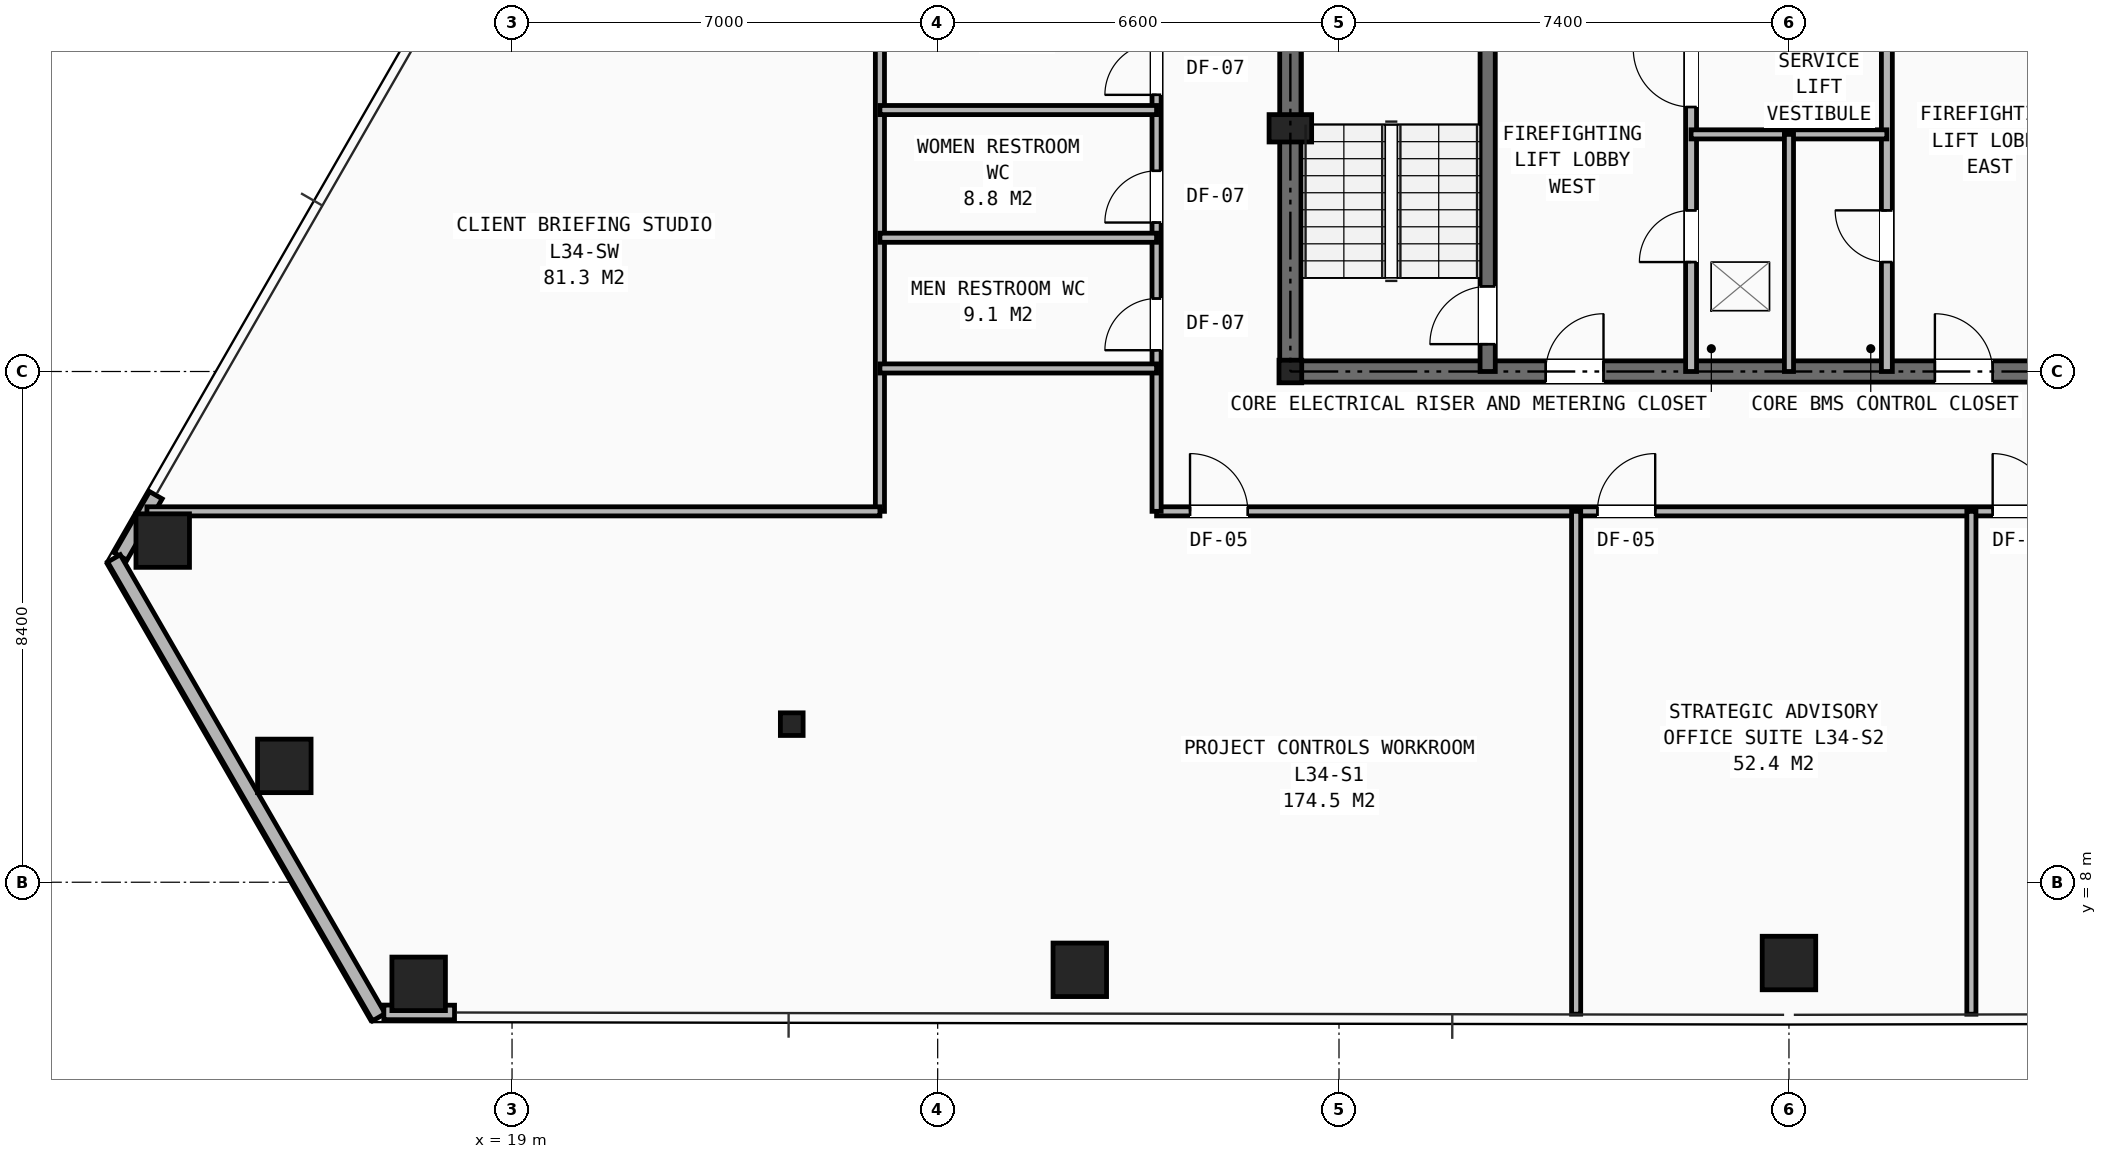
"""IFC4 building model, lengths in metres.
Left out: names, types, materials, properties, quantities, classifications, styles, units other than length and angle.
Written with IfcOpenShell. Run it as: python <this file> out.ifc"""

import sys

from ifc_helpers import new_model, si_unit, direction, frame, frame_2d, origin, origin_2d, place, context, subcontext, project, spatial, rectangle, hollow_rectangle, i_section, extrude, element, fill, save


model = new_model("IFC4")
c1 = context("Model", 3, precision=1e-05, world=origin(), true_north=direction((0.0, 1.0)))
c2 = subcontext(c1, "Body", "Model", "MODEL_VIEW")
j1 = project(units=[si_unit("LENGTHUNIT", "METRE"), si_unit("PLANEANGLEUNIT", "RADIAN")], contexts=[c1])
p1 = place(None, origin())
s1 = spatial("IfcSite", under=j1, at=p1, CompositionType="ELEMENT")
p2 = place(p1, origin())
s2 = spatial("IfcBuilding", under=s1, at=p2, CompositionType="ELEMENT")
p3 = place(p2, frame((0.0, 0.0, 119.45)))
s3 = spatial("IfcBuildingStorey", under=s2, at=p3, CompositionType="ELEMENT", Elevation=119.45)
for number, where, z_axis, x_axis in (
    (1, (31.8, 16.4, 0.0), (0.0, 0.0, 1.0), (1.0, 0.0, 0.0)),
    (2, (23.6, 10.6, 0.0), (0.0, 0.0, 1.0), (1.0, 0.0, 0.0)),
):
    element("IfcColumn", number, at=place(p3, frame(where, z_axis=z_axis, x_axis=x_axis)), inside=s3, PredefinedType="COLUMN", context=c2, shape_type="SweptSolid", body=[
        extrude(i_section(OverallWidth=0.374, OverallDepth=0.372, WebThickness=0.016, FlangeThickness=0.026, at=origin_2d()), origin(), (0.0, 0.0, 1.0), 3.45),
    ])
p4 = place(p3, frame((31.8, 20.4, 0.0), z_axis=(0.0, 0.0, 1.0), x_axis=(1.0, 0.0, 0.0)))
e3 = element("IfcColumn", 3, at=p4, inside=s3, PredefinedType="PILASTER", context=c2, shape_type="SweptSolid", body=[
    extrude(rectangle(XDim=0.7, YDim=0.45, at=origin_2d()), origin(), (0.0, 0.0, 1.0), 3.45),
])
for number, where, z_axis, x_axis in (
    (4, (13.255, 13.619, 0.0), (0.0, 0.0, 1.0), (1.0, 0.0, 0.0)),
    (5, (15.255, 9.913, 0.0), (0.0, 0.0, 1.0), (1.0, 0.0, 0.0)),
    (6, (17.464, 6.329, 0.0), (0.0, 0.0, 1.0), (1.0, 0.0, 0.0)),
    (7, (28.337, 6.56, 0.0), (0.0, 0.0, 1.0), (1.0, 0.0, 0.0)),
    (8, (40.0, 6.671, 0.0), (0.0, 0.0, 1.0), (1.0, 0.0, 0.0)),
):
    element("IfcColumn", number, at=place(p3, frame(where, z_axis=z_axis, x_axis=x_axis)), inside=s3, PredefinedType="COLUMN", context=c2, shape_type="SweptSolid", body=[
        extrude(hollow_rectangle(XDim=0.88, YDim=0.88, WallThickness=0.06, at=origin_2d()), origin(), (0.0, 0.0, 1.0), 3.45),
    ])
p5 = place(p3, frame((13.142, 14.365, 0.0), z_axis=(0.0, 0.0, 1.0), x_axis=(-0.498625017703, -0.866817796149, 0.0)))
e9 = element("IfcWall", 9, at=p5, inside=s3, PredefinedType="SHEAR", context=c2, shape_type="SweptSolid", body=[
    extrude(rectangle(XDim=1.162, YDim=0.24, at=frame_2d((0.581, 0.0))), origin(), (0.0, 0.0, 1.0), 2.583),
])
p6 = place(p3, frame((16.81, 5.78, 0.0), z_axis=(0.0, 0.0, 1.0), x_axis=(-0.499998917442, 0.866026028799, 0.0)))
e10 = element("IfcWall", 10, at=p6, inside=s3, PredefinedType="SHEAR", context=c2, shape_type="SweptSolid", body=[
    extrude(rectangle(XDim=8.714, YDim=0.24, at=frame_2d((4.357, 0.0))), origin(), (0.0, 0.0, 1.0), 2.583),
])
p7 = place(p3, frame((16.892, 5.86, 0.0), z_axis=(0.0, 0.0, 1.0), x_axis=(0.999998588859, -0.00167996403, 0.0)))
e11 = element("IfcWall", 11, at=p7, inside=s3, PredefinedType="SHEAR", context=c2, shape_type="SweptSolid", body=[
    extrude(rectangle(XDim=1.163, YDim=0.24, at=frame_2d((0.581, 0.0))), origin(), (0.0, 0.0, 1.0), 2.583),
])
p8 = place(p3, frame((31.8, 16.4, 0.0), z_axis=(0.0, 0.0, 1.0), x_axis=(1.0, 0.0, 0.0)))
e12 = element("IfcWall", 12, at=p8, inside=s3, PredefinedType="SHEAR", context=c2, shape_type="SweptSolid", body=[
    extrude(rectangle(XDim=16.4, YDim=0.35, at=frame_2d((8.2, 0.0))), origin(), (0.0, 0.0, 1.0), 3.21),
])
p9 = place(p8, frame((4.2, 0.0, 0.0)))
e13 = element("IfcOpeningElement", 13, at=p9, cuts=e12, PredefinedType="OPENING", context=c2, shape_type="SweptSolid", body=[
    extrude(rectangle(XDim=0.95, YDim=2.1, at=frame_2d((0.475, 1.05))), frame((0.0, 0.185, 0.0), z_axis=(0.0, -1.0, 0.0), x_axis=(1.0, 0.0, 0.0)), (0.0, 0.0, 1.0), 0.37),
])
p10 = place(p8, frame((10.6, 0.0, 0.0)))
e14 = element("IfcOpeningElement", 14, at=p10, cuts=e12, PredefinedType="OPENING", context=c2, shape_type="SweptSolid", body=[
    extrude(rectangle(XDim=0.95, YDim=2.1, at=frame_2d((0.475, 1.05))), frame((0.0, 0.185, 0.0), z_axis=(0.0, -1.0, 0.0), x_axis=(1.0, 0.0, 0.0)), (0.0, 0.0, 1.0), 0.37),
])
p11 = place(p3, frame((31.8, 16.4, 0.0), z_axis=(0.0, 0.0, 1.0), x_axis=(0.0, 1.0, 0.0)))
e15 = element("IfcWall", 15, at=p11, inside=s3, PredefinedType="SHEAR", context=c2, shape_type="SweptSolid", body=[
    extrude(rectangle(XDim=14.8, YDim=0.35, at=frame_2d((7.4, 0.0))), origin(), (0.0, 0.0, 1.0), 3.21),
])
p12 = place(p11, frame((11.0, 0.0, 0.0)))
e16 = element("IfcOpeningElement", 16, at=p12, cuts=e15, PredefinedType="OPENING", context=c2, shape_type="SweptSolid", body=[
    extrude(rectangle(XDim=1.1, YDim=2.15, at=frame_2d((0.55, 1.075))), frame((0.0, 0.185, 0.0), z_axis=(0.0, -1.0, 0.0), x_axis=(1.0, 0.0, 0.0)), (0.0, 0.0, 1.0), 0.37),
])
p13 = place(p3, frame((35.045, 16.4, 0.0), z_axis=(0.0, 0.0, 1.0), x_axis=(0.0, 1.0, 0.0)))
e17 = element("IfcWall", 17, at=p13, inside=s3, PredefinedType="SHEAR", context=c2, shape_type="SweptSolid", body=[
    extrude(rectangle(XDim=8.4, YDim=0.25, at=frame_2d((4.2, 0.0))), origin(), (0.0, 0.0, 1.0), 3.21),
])
p14 = place(p13, frame((0.45, 0.0, 0.0)))
e18 = element("IfcOpeningElement", 18, at=p14, cuts=e17, PredefinedType="OPENING", context=c2, shape_type="SweptSolid", body=[
    extrude(rectangle(XDim=0.95, YDim=2.1, at=frame_2d((0.475, 1.05))), frame((0.0, 0.135, 0.0), z_axis=(0.0, -1.0, 0.0), x_axis=(1.0, 0.0, 0.0)), (0.0, 0.0, 1.0), 0.27),
])
p15 = place(p3, frame((38.39, 16.4, 0.0), z_axis=(0.0, 0.0, 1.0), x_axis=(0.0, 1.0, 0.0)))
e19 = element("IfcWall", 19, at=p15, inside=s3, PredefinedType="PARTITIONING", context=c2, shape_type="SweptSolid", body=[
    extrude(rectangle(XDim=8.4, YDim=0.18, at=frame_2d((4.2, 0.0))), origin(), (0.0, 0.0, 1.0), 2.661),
])
p16 = place(p15, frame((1.8, 0.0, 0.0)))
e20 = element("IfcOpeningElement", 20, at=p16, cuts=e19, PredefinedType="OPENING", context=c2, shape_type="SweptSolid", body=[
    extrude(rectangle(XDim=0.85, YDim=2.05, at=frame_2d((0.425, 1.025))), frame((0.0, 0.1, 0.0), z_axis=(0.0, -1.0, 0.0), x_axis=(1.0, 0.0, 0.0)), (0.0, 0.0, 1.0), 0.2),
])
p17 = place(p15, frame((4.35, 0.0, 0.0)))
e21 = element("IfcOpeningElement", 21, at=p17, cuts=e19, PredefinedType="OPENING", context=c2, shape_type="SweptSolid", body=[
    extrude(rectangle(XDim=0.95, YDim=2.1, at=frame_2d((0.475, 1.05))), frame((0.0, 0.1, 0.0), z_axis=(0.0, -1.0, 0.0), x_axis=(1.0, 0.0, 0.0)), (0.0, 0.0, 1.0), 0.2),
])
p18 = place(p3, frame((41.61, 16.4, 0.0), z_axis=(0.0, 0.0, 1.0), x_axis=(0.0, 1.0, 0.0)))
e22 = element("IfcWall", 22, at=p18, inside=s3, PredefinedType="PARTITIONING", context=c2, shape_type="SweptSolid", body=[
    extrude(rectangle(XDim=8.4, YDim=0.18, at=frame_2d((4.2, 0.0))), origin(), (0.0, 0.0, 1.0), 2.661),
])
p19 = place(p18, frame((1.8, 0.0, 0.0)))
e23 = element("IfcOpeningElement", 23, at=p19, cuts=e22, PredefinedType="OPENING", context=c2, shape_type="SweptSolid", body=[
    extrude(rectangle(XDim=0.85, YDim=2.05, at=frame_2d((0.425, 1.025))), frame((0.0, 0.1, 0.0), z_axis=(0.0, -1.0, 0.0), x_axis=(1.0, 0.0, 0.0)), (0.0, 0.0, 1.0), 0.2),
])
p20 = place(p3, frame((38.39, 20.3, 0.0), z_axis=(0.0, 0.0, 1.0), x_axis=(1.0, 0.0, 0.0)))
e24 = element("IfcWall", 24, at=p20, inside=s3, PredefinedType="PARTITIONING", context=c2, shape_type="SweptSolid", body=[
    extrude(rectangle(XDim=3.22, YDim=0.15, at=frame_2d((1.61, 0.0))), origin(), (0.0, 0.0, 1.0), 3.21),
])
p21 = place(p3, frame((40.0, 16.4, 0.0), z_axis=(0.0, 0.0, 1.0), x_axis=(0.0, 1.0, 0.0)))
e25 = element("IfcWall", 25, at=p21, inside=s3, PredefinedType="PARTITIONING", context=c2, shape_type="SweptSolid", body=[
    extrude(rectangle(XDim=3.9, YDim=0.15, at=frame_2d((1.95, 0.0))), origin(), (0.0, 0.0, 1.0), 2.661),
])
p22 = place(p3, frame((29.6, 14.1, 0.0), z_axis=(0.0, 0.0, 1.0), x_axis=(1.0, 0.0, 0.0)))
e26 = element("IfcWall", 26, at=p22, inside=s3, PredefinedType="PARTITIONING", context=c2, shape_type="SweptSolid", body=[
    extrude(rectangle(XDim=18.6, YDim=0.15, at=frame_2d((9.3, 0.0))), origin(), (0.0, 0.0, 1.0), 2.252),
])
p23 = place(p22, frame((0.55, 0.0, 0.0)))
e27 = element("IfcOpeningElement", 27, at=p23, cuts=e26, PredefinedType="OPENING", context=c2, shape_type="SweptSolid", body=[
    extrude(rectangle(XDim=0.95, YDim=2.1, at=frame_2d((0.475, 1.05))), frame((0.0, 0.085, 0.0), z_axis=(0.0, -1.0, 0.0), x_axis=(1.0, 0.0, 0.0)), (0.0, 0.0, 1.0), 0.17),
])
p24 = place(p22, frame((7.25, 0.0, 0.0)))
e28 = element("IfcOpeningElement", 28, at=p24, cuts=e26, PredefinedType="OPENING", context=c2, shape_type="SweptSolid", body=[
    extrude(rectangle(XDim=0.95, YDim=2.1, at=frame_2d((0.475, 1.05))), frame((0.0, 0.085, 0.0), z_axis=(0.0, -1.0, 0.0), x_axis=(1.0, 0.0, 0.0)), (0.0, 0.0, 1.0), 0.17),
])
p25 = place(p22, frame((13.75, 0.0, 0.0)))
e29 = element("IfcOpeningElement", 29, at=p25, cuts=e26, PredefinedType="OPENING", context=c2, shape_type="SweptSolid", body=[
    extrude(rectangle(XDim=0.95, YDim=2.1, at=frame_2d((0.475, 1.05))), frame((0.0, 0.085, 0.0), z_axis=(0.0, -1.0, 0.0), x_axis=(1.0, 0.0, 0.0)), (0.0, 0.0, 1.0), 0.17),
])
p26 = place(p3, frame((29.6, 14.1, 0.0), z_axis=(0.0, 0.0, 1.0), x_axis=(0.0, 1.0, 0.0)))
e30 = element("IfcWall", 30, at=p26, inside=s3, PredefinedType="PARTITIONING", context=c2, shape_type="SweptSolid", body=[
    extrude(rectangle(XDim=8.7, YDim=0.15, at=frame_2d((4.35, 0.0))), origin(), (0.0, 0.0, 1.0), 3.21),
])
p27 = place(p26, frame((2.65, 0.0, 0.0)))
e31 = element("IfcOpeningElement", 31, at=p27, cuts=e30, PredefinedType="OPENING", context=c2, shape_type="SweptSolid", body=[
    extrude(rectangle(XDim=0.85, YDim=2.05, at=frame_2d((0.425, 1.025))), frame((0.0, 0.085, 0.0), z_axis=(0.0, -1.0, 0.0), x_axis=(1.0, 0.0, 0.0)), (0.0, 0.0, 1.0), 0.17),
])
p28 = place(p26, frame((4.75, 0.0, 0.0)))
e32 = element("IfcOpeningElement", 32, at=p28, cuts=e30, PredefinedType="OPENING", context=c2, shape_type="SweptSolid", body=[
    extrude(rectangle(XDim=0.85, YDim=2.05, at=frame_2d((0.425, 1.025))), frame((0.0, 0.085, 0.0), z_axis=(0.0, -1.0, 0.0), x_axis=(1.0, 0.0, 0.0)), (0.0, 0.0, 1.0), 0.17),
])
p29 = place(p26, frame((6.85, 0.0, 0.0)))
e33 = element("IfcOpeningElement", 33, at=p29, cuts=e30, PredefinedType="OPENING", context=c2, shape_type="SweptSolid", body=[
    extrude(rectangle(XDim=0.85, YDim=2.05, at=frame_2d((0.425, 1.025))), frame((0.0, 0.085, 0.0), z_axis=(0.0, -1.0, 0.0), x_axis=(1.0, 0.0, 0.0)), (0.0, 0.0, 1.0), 0.17),
])
p30 = place(p3, frame((25.05, 14.1, 0.0), z_axis=(0.0, 0.0, 1.0), x_axis=(0.0, 1.0, 0.0)))
e34 = element("IfcWall", 34, at=p30, inside=s3, PredefinedType="PARTITIONING", context=c2, shape_type="SweptSolid", body=[
    extrude(rectangle(XDim=8.7, YDim=0.15, at=frame_2d((4.35, 0.0))), origin(), (0.0, 0.0, 1.0), 3.21),
])
for number, where, z_axis, x_axis in (
    (35, (25.05, 16.45, 0.0), (0.0, 0.0, 1.0), (1.0, 0.0, 0.0)),
    (36, (25.05, 18.6, 0.0), (0.0, 0.0, 1.0), (1.0, 0.0, 0.0)),
    (37, (25.05, 20.7, 0.0), (0.0, 0.0, 1.0), (1.0, 0.0, 0.0)),
):
    element("IfcWall", number, at=place(p3, frame(where, z_axis=z_axis, x_axis=x_axis)), inside=s3, PredefinedType="PARTITIONING", context=c2, shape_type="SweptSolid", body=[
        extrude(rectangle(XDim=4.55, YDim=0.15, at=frame_2d((2.275, 0.0))), origin(), (0.0, 0.0, 1.0), 3.21),
    ])
p31 = place(p3, frame((36.5, 5.83, 0.0), z_axis=(0.0, 0.0, 1.0), x_axis=(0.0, 1.0, 0.0)))
e38 = element("IfcWall", 38, at=p31, inside=s3, PredefinedType="PARTITIONING", context=c2, shape_type="SweptSolid", body=[
    extrude(rectangle(XDim=8.27, YDim=0.15, at=frame_2d((4.135, 0.0))), origin(), (0.0, 0.0, 1.0), 2.252),
])
p32 = place(p3, frame((43.0, 5.83, 0.0), z_axis=(0.0, 0.0, 1.0), x_axis=(0.0, 1.0, 0.0)))
e39 = element("IfcWall", 39, at=p32, inside=s3, PredefinedType="PARTITIONING", context=c2, shape_type="SweptSolid", body=[
    extrude(rectangle(XDim=8.271, YDim=0.15, at=frame_2d((4.135, 0.0))), origin(), (0.0, 0.0, 1.0), 2.589),
])
p33 = place(p3, frame((12.995, 14.1, 0.0), z_axis=(0.0, 0.0, 1.0), x_axis=(1.0, 0.0, 0.0)))
e40 = element("IfcWall", 40, at=p33, inside=s3, PredefinedType="PARTITIONING", context=c2, shape_type="SweptSolid", body=[
    extrude(rectangle(XDim=12.055, YDim=0.15, at=frame_2d((6.027, 0.0))), origin(), (0.0, 0.0, 1.0), 2.589),
])
p34 = place(p16, origin())
e41 = element("IfcDoor", 41, at=p34, inside=s3, OperationType="SINGLE_SWING_LEFT", PredefinedType="DOOR", context=c2, shape_type="SweptSolid", body=[
    extrude(rectangle(XDim=0.85, YDim=2.05, at=frame_2d((0.425, 1.025))), frame((0.0, 0.025, 0.0), z_axis=(0.0, -1.0, 0.0), x_axis=(1.0, 0.0, 0.0)), (0.0, 0.0, 1.0), 0.05),
])
fill(e20, e41)
p35 = place(p19, origin())
e42 = element("IfcDoor", 42, at=p35, inside=s3, OperationType="SINGLE_SWING_RIGHT", PredefinedType="DOOR", context=c2, shape_type="SweptSolid", body=[
    extrude(rectangle(XDim=0.85, YDim=2.05, at=frame_2d((0.425, 1.025))), frame((0.0, 0.025, 0.0), z_axis=(0.0, -1.0, 0.0), x_axis=(1.0, 0.0, 0.0)), (0.0, 0.0, 1.0), 0.05),
])
fill(e23, e42)
p36 = place(p17, origin())
e43 = element("IfcDoor", 43, at=p36, inside=s3, OperationType="SINGLE_SWING_RIGHT", PredefinedType="DOOR", context=c2, shape_type="SweptSolid", body=[
    extrude(rectangle(XDim=0.95, YDim=2.1, at=frame_2d((0.475, 1.05))), frame((0.0, 0.025, 0.0), z_axis=(0.0, -1.0, 0.0), x_axis=(1.0, 0.0, 0.0)), (0.0, 0.0, 1.0), 0.05),
])
fill(e21, e43)
p37 = place(p14, origin())
e44 = element("IfcDoor", 44, at=p37, inside=s3, OperationType="SINGLE_SWING_LEFT", PredefinedType="DOOR", context=c2, shape_type="SweptSolid", body=[
    extrude(rectangle(XDim=0.95, YDim=2.1, at=frame_2d((0.475, 1.05))), frame((0.0, 0.025, 0.0), z_axis=(0.0, -1.0, 0.0), x_axis=(1.0, 0.0, 0.0)), (0.0, 0.0, 1.0), 0.05),
])
fill(e18, e44)
p38 = place(p9, origin())
e45 = element("IfcDoor", 45, at=p38, inside=s3, OperationType="SINGLE_SWING_RIGHT", PredefinedType="DOOR", context=c2, shape_type="SweptSolid", body=[
    extrude(rectangle(XDim=0.95, YDim=2.1, at=frame_2d((0.475, 1.05))), frame((0.0, 0.025, 0.0), z_axis=(0.0, -1.0, 0.0), x_axis=(1.0, 0.0, 0.0)), (0.0, 0.0, 1.0), 0.05),
])
fill(e13, e45)
p39 = place(p10, origin())
e46 = element("IfcDoor", 46, at=p39, inside=s3, OperationType="SINGLE_SWING_LEFT", PredefinedType="DOOR", context=c2, shape_type="SweptSolid", body=[
    extrude(rectangle(XDim=0.95, YDim=2.1, at=frame_2d((0.475, 1.05))), frame((0.0, 0.025, 0.0), z_axis=(0.0, -1.0, 0.0), x_axis=(1.0, 0.0, 0.0)), (0.0, 0.0, 1.0), 0.05),
])
fill(e14, e46)
p40 = place(p27, origin())
e47 = element("IfcDoor", 47, at=p40, inside=s3, OperationType="SINGLE_SWING_LEFT", PredefinedType="DOOR", context=c2, shape_type="SweptSolid", body=[
    extrude(rectangle(XDim=0.85, YDim=2.05, at=frame_2d((0.425, 1.025))), frame((0.0, 0.025, 0.0), z_axis=(0.0, -1.0, 0.0), x_axis=(1.0, 0.0, 0.0)), (0.0, 0.0, 1.0), 0.05),
])
fill(e31, e47)
p41 = place(p28, origin())
e48 = element("IfcDoor", 48, at=p41, inside=s3, OperationType="SINGLE_SWING_LEFT", PredefinedType="DOOR", context=c2, shape_type="SweptSolid", body=[
    extrude(rectangle(XDim=0.85, YDim=2.05, at=frame_2d((0.425, 1.025))), frame((0.0, 0.025, 0.0), z_axis=(0.0, -1.0, 0.0), x_axis=(1.0, 0.0, 0.0)), (0.0, 0.0, 1.0), 0.05),
])
fill(e32, e48)
p42 = place(p29, origin())
e49 = element("IfcDoor", 49, at=p42, inside=s3, OperationType="SINGLE_SWING_LEFT", PredefinedType="DOOR", context=c2, shape_type="SweptSolid", body=[
    extrude(rectangle(XDim=0.85, YDim=2.05, at=frame_2d((0.425, 1.025))), frame((0.0, 0.025, 0.0), z_axis=(0.0, -1.0, 0.0), x_axis=(1.0, 0.0, 0.0)), (0.0, 0.0, 1.0), 0.05),
])
fill(e33, e49)
p43 = place(p23, origin())
e50 = element("IfcDoor", 50, at=p43, inside=s3, OperationType="SINGLE_SWING_LEFT", PredefinedType="DOOR", context=c2, shape_type="SweptSolid", body=[
    extrude(rectangle(XDim=0.95, YDim=2.1, at=frame_2d((0.475, 1.05))), frame((0.0, 0.025, 0.0), z_axis=(0.0, -1.0, 0.0), x_axis=(1.0, 0.0, 0.0)), (0.0, 0.0, 1.0), 0.05),
])
fill(e27, e50)
p44 = place(p24, origin())
e51 = element("IfcDoor", 51, at=p44, inside=s3, OperationType="SINGLE_SWING_RIGHT", PredefinedType="DOOR", context=c2, shape_type="SweptSolid", body=[
    extrude(rectangle(XDim=0.95, YDim=2.1, at=frame_2d((0.475, 1.05))), frame((0.0, 0.025, 0.0), z_axis=(0.0, -1.0, 0.0), x_axis=(1.0, 0.0, 0.0)), (0.0, 0.0, 1.0), 0.05),
])
fill(e28, e51)
p45 = place(p25, origin())
e52 = element("IfcDoor", 52, at=p45, inside=s3, OperationType="SINGLE_SWING_LEFT", PredefinedType="DOOR", context=c2, shape_type="SweptSolid", body=[
    extrude(rectangle(XDim=0.95, YDim=2.1, at=frame_2d((0.475, 1.05))), frame((0.0, 0.025, 0.0), z_axis=(0.0, -1.0, 0.0), x_axis=(1.0, 0.0, 0.0)), (0.0, 0.0, 1.0), 0.05),
])
fill(e29, e52)
save(model, sys.argv[1])
